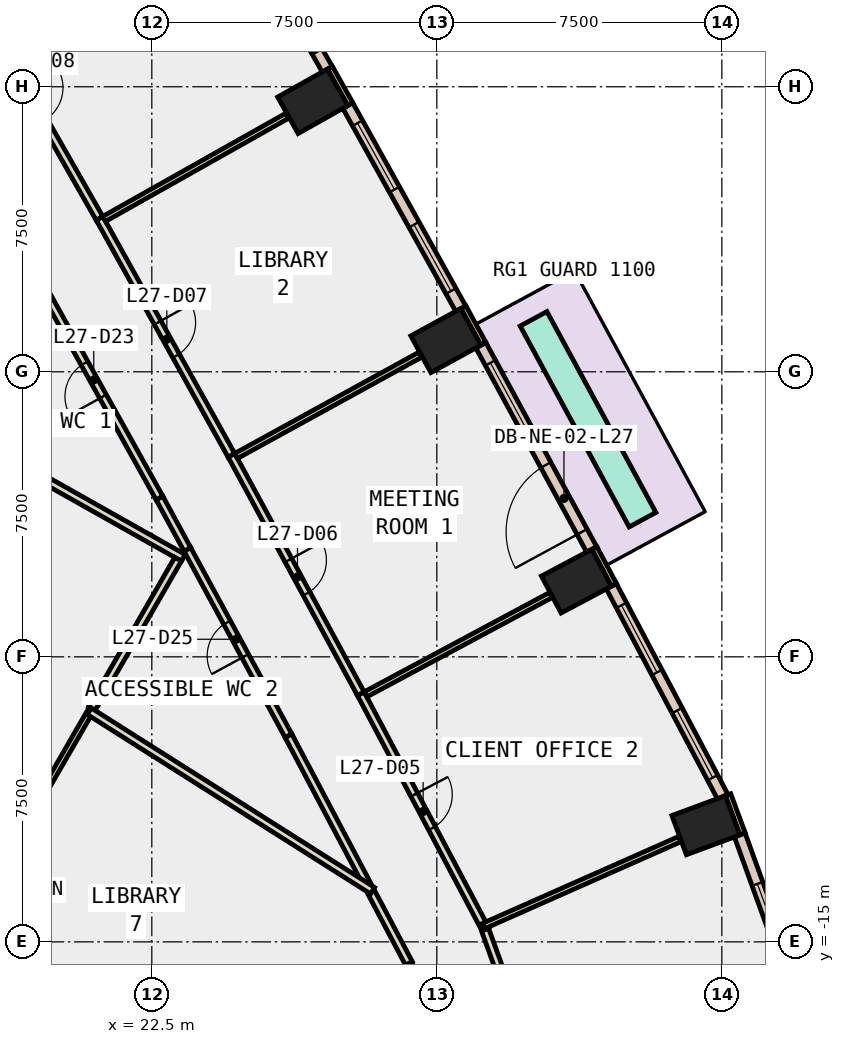
"""IFC4 building model, lengths in metres.
Left out: names, types, materials, properties, quantities, classifications, styles, units other than length and angle.
Written with IfcOpenShell. Run it as: python <this file> out.ifc"""

import sys

from ifc_helpers import new_model, si_unit, direction, frame, frame_2d, origin, origin_2d, place, context, subcontext, project, spatial, rectangle, extrude, element, fill, save


model = new_model("IFC4")
c1 = context("Model", 3, precision=1e-05, world=origin(), true_north=direction((0.0, 1.0)))
c2 = subcontext(c1, "Body", "Model", "MODEL_VIEW")
j1 = project(units=[si_unit("LENGTHUNIT", "METRE"), si_unit("PLANEANGLEUNIT", "RADIAN")], contexts=[c1])
p1 = place(None, origin())
s1 = spatial("IfcSite", under=j1, at=p1, CompositionType="ELEMENT")
p2 = place(p1, origin())
s2 = spatial("IfcBuilding", under=s1, at=p2, CompositionType="ELEMENT")
p3 = place(p2, frame((0.0, 0.0, 124.4)))
s3 = spatial("IfcBuildingStorey", under=s2, at=p3, CompositionType="ELEMENT", Elevation=124.4)
for number, where, z_axis, x_axis in (
    (1, (37.08, -11.931, -0.4), (0.0, 0.0, 1.0), (-0.347, 0.938, 0.0)),
    (2, (33.674, -5.509, -0.4), (0.0, 0.0, 1.0), (-0.469, 0.883, 0.0)),
    (3, (30.238, 0.822, -0.4), (0.0, 0.0, 1.0), (-0.48, 0.877, 0.0)),
    (4, (26.735, 7.117, -0.4), (0.0, 0.0, 1.0), (-0.49, 0.872, 0.0)),
):
    element("IfcColumn", number, at=place(p3, frame(where, z_axis=z_axis, x_axis=x_axis)), inside=s3, PredefinedType="COLUMN", context=c2, shape_type="SweptSolid", body=[
        extrude(rectangle(XDim=1.1, YDim=1.5, at=origin_2d()), origin(), (0.0, 0.0, 1.0), 4.2),
    ])
p4 = place(p3, frame((38.045, -12.16, 0.0), z_axis=(0.0, 0.0, 1.0), x_axis=(-0.347010833361, 0.937861120598, 0.0)))
e5 = element("IfcWall", 5, at=p4, inside=s3, PredefinedType="STANDARD", context=c2, shape_type="SweptSolid", body=[
    extrude(rectangle(XDim=1.1, YDim=0.15, at=frame_2d((0.55, 0.0))), origin(), (0.0, 0.0, 1.0), 3.8),
])
p5 = place(p3, frame((34.661, -5.608, 0.0), z_axis=(0.0, 0.0, 1.0), x_axis=(-0.46919310775, 0.883095593716, 0.0)))
e6 = element("IfcWall", 6, at=p5, inside=s3, PredefinedType="STANDARD", context=c2, shape_type="SweptSolid", body=[
    extrude(rectangle(XDim=1.099, YDim=0.15, at=frame_2d((0.55, 0.0))), origin(), (0.0, 0.0, 1.0), 3.8),
])
p6 = place(p3, frame((31.226, 0.735, 0.0), z_axis=(0.0, 0.0, 1.0), x_axis=(-0.479737645119, 0.877411985247, 0.0)))
e7 = element("IfcWall", 7, at=p6, inside=s3, PredefinedType="STANDARD", context=c2, shape_type="SweptSolid", body=[
    extrude(rectangle(XDim=1.101, YDim=0.15, at=frame_2d((0.55, 0.0))), origin(), (0.0, 0.0, 1.0), 3.8),
])
p7 = place(p3, frame((27.724, 7.042, 0.0), z_axis=(0.0, 0.0, 1.0), x_axis=(-0.490008344094, 0.871717742574, 0.0)))
e8 = element("IfcWall", 8, at=p7, inside=s3, PredefinedType="STANDARD", context=c2, shape_type="SweptSolid", body=[
    extrude(rectangle(XDim=1.1, YDim=0.15, at=frame_2d((0.55, 0.0))), origin(), (0.0, 0.0, 1.0), 3.8),
])
p8 = place(p3, frame((39.379, -16.077, 0.0), z_axis=(0.0, 0.0, 1.0), x_axis=(-0.340477955209, 0.940252499075, 0.0)))
e9 = element("IfcWall", 9, at=p8, inside=s3, PredefinedType="STANDARD", context=c2, shape_type="SweptSolid", body=[
    extrude(rectangle(XDim=4.138, YDim=0.3, at=frame_2d((2.069, 0.0))), origin(), (0.0, 0.0, 1.0), 3.8),
])
p9 = place(p8, frame((1.369, 0.0, 0.9)))
e10 = element("IfcOpeningElement", 10, at=p9, cuts=e9, PredefinedType="OPENING", context=c2, shape_type="SweptSolid", body=[
    extrude(rectangle(XDim=1.4, YDim=2.6, at=frame_2d((0.7, 1.3))), frame((0.0, 0.16, 0.0), z_axis=(0.0, -1.0, 0.0), x_axis=(1.0, 0.0, 0.0)), (0.0, 0.0, 1.0), 0.32),
])
p10 = place(p3, frame((37.523, -11.181, 0.0), z_axis=(0.0, 0.0, 1.0), x_axis=(-0.467654949391, 0.883911108828, 0.0)))
e11 = element("IfcWall", 11, at=p10, inside=s3, PredefinedType="STANDARD", context=c2, shape_type="SweptSolid", body=[
    extrude(rectangle(XDim=6.265, YDim=0.3, at=frame_2d((3.133, 0.0))), origin(), (0.0, 0.0, 1.0), 3.8),
])
p11 = place(p10, frame((0.566, 0.0, 0.9)))
e12 = element("IfcOpeningElement", 12, at=p11, cuts=e11, PredefinedType="OPENING", context=c2, shape_type="SweptSolid", body=[
    extrude(rectangle(XDim=2.0, YDim=2.6, at=frame_2d((1.0, 1.3))), frame((0.0, 0.16, 0.0), z_axis=(0.0, -1.0, 0.0), x_axis=(1.0, 0.0, 0.0)), (0.0, 0.0, 1.0), 0.32),
])
p12 = place(p10, frame((3.699, 0.0, 0.9)))
e13 = element("IfcOpeningElement", 13, at=p12, cuts=e11, PredefinedType="OPENING", context=c2, shape_type="SweptSolid", body=[
    extrude(rectangle(XDim=2.0, YDim=2.6, at=frame_2d((1.0, 1.3))), frame((0.0, 0.16, 0.0), z_axis=(0.0, -1.0, 0.0), x_axis=(1.0, 0.0, 0.0)), (0.0, 0.0, 1.0), 0.32),
])
p13 = place(p3, frame((34.075, -4.675, 0.0), z_axis=(0.0, 0.0, 1.0), x_axis=(-0.476982616152, 0.878912728255, 0.0)))
e14 = element("IfcWall", 14, at=p13, inside=s3, PredefinedType="STANDARD", context=c2, shape_type="SweptSolid", body=[
    extrude(rectangle(XDim=6.115, YDim=0.3, at=frame_2d((3.058, 0.0))), origin(), (0.0, 0.0, 1.0), 3.8),
])
p14 = place(p13, frame((0.529, 0.0, 0.0)))
e15 = element("IfcOpeningElement", 15, at=p14, cuts=e14, PredefinedType="OPENING", context=c2, shape_type="SweptSolid", body=[
    extrude(rectangle(XDim=2.0, YDim=2.4, at=frame_2d((1.0, 1.2))), frame((0.0, 0.16, 0.0), z_axis=(0.0, -1.0, 0.0), x_axis=(1.0, 0.0, 0.0)), (0.0, 0.0, 1.0), 0.32),
])
p15 = place(p13, frame((3.587, 0.0, 0.9)))
e16 = element("IfcOpeningElement", 16, at=p15, cuts=e14, PredefinedType="OPENING", context=c2, shape_type="SweptSolid", body=[
    extrude(rectangle(XDim=2.0, YDim=2.6, at=frame_2d((1.0, 1.3))), frame((0.0, 0.16, 0.0), z_axis=(0.0, -1.0, 0.0), x_axis=(1.0, 0.0, 0.0)), (0.0, 0.0, 1.0), 0.32),
])
p16 = place(p3, frame((30.629, 1.662, 0.0), z_axis=(0.0, 0.0, 1.0), x_axis=(-0.486229342917, 0.873831234327, 0.0)))
e17 = element("IfcWall", 17, at=p16, inside=s3, PredefinedType="STANDARD", context=c2, shape_type="SweptSolid", body=[
    extrude(rectangle(XDim=6.114, YDim=0.3, at=frame_2d((3.057, 0.0))), origin(), (0.0, 0.0, 1.0), 3.8),
])
p17 = place(p16, frame((0.529, 0.0, 0.9)))
e18 = element("IfcOpeningElement", 18, at=p17, cuts=e17, PredefinedType="OPENING", context=c2, shape_type="SweptSolid", body=[
    extrude(rectangle(XDim=2.0, YDim=2.6, at=frame_2d((1.0, 1.3))), frame((0.0, 0.16, 0.0), z_axis=(0.0, -1.0, 0.0), x_axis=(1.0, 0.0, 0.0)), (0.0, 0.0, 1.0), 0.32),
])
p18 = place(p16, frame((3.586, 0.0, 0.9)))
e19 = element("IfcOpeningElement", 19, at=p18, cuts=e17, PredefinedType="OPENING", context=c2, shape_type="SweptSolid", body=[
    extrude(rectangle(XDim=2.0, YDim=2.6, at=frame_2d((1.0, 1.3))), frame((0.0, 0.16, 0.0), z_axis=(0.0, -1.0, 0.0), x_axis=(1.0, 0.0, 0.0)), (0.0, 0.0, 1.0), 0.32),
])
p19 = place(p3, frame((27.117, 7.961, 0.0), z_axis=(0.0, 0.0, 1.0), x_axis=(-0.495472401298, 0.868623681206, 0.0)))
e20 = element("IfcWall", 20, at=p19, inside=s3, PredefinedType="STANDARD", context=c2, shape_type="SweptSolid", body=[
    extrude(rectangle(XDim=6.115, YDim=0.3, at=frame_2d((3.058, 0.0))), origin(), (0.0, 0.0, 1.0), 3.8),
])
p20 = place(p19, frame((0.529, 0.0, 0.9)))
e21 = element("IfcOpeningElement", 21, at=p20, cuts=e20, PredefinedType="OPENING", context=c2, shape_type="SweptSolid", body=[
    extrude(rectangle(XDim=2.0, YDim=2.6, at=frame_2d((1.0, 1.3))), frame((0.0, 0.16, 0.0), z_axis=(0.0, -1.0, 0.0), x_axis=(1.0, 0.0, 0.0)), (0.0, 0.0, 1.0), 0.32),
])
p21 = place(p19, frame((3.587, 0.0, 0.9)))
e22 = element("IfcOpeningElement", 22, at=p21, cuts=e20, PredefinedType="OPENING", context=c2, shape_type="SweptSolid", body=[
    extrude(rectangle(XDim=2.0, YDim=2.6, at=frame_2d((1.0, 1.3))), frame((0.0, 0.16, 0.0), z_axis=(0.0, -1.0, 0.0), x_axis=(1.0, 0.0, 0.0)), (0.0, 0.0, 1.0), 0.32),
])
p22 = place(p3, frame((35.413, -3.892, 0.0), z_axis=(0.0, 0.0, 1.0), x_axis=(-0.476905516251, 0.878954565702, 0.0)))
e23 = element("IfcWall", 23, at=p22, inside=s3, PredefinedType="STANDARD", context=c2, shape_type="SweptSolid", body=[
    extrude(rectangle(XDim=6.014, YDim=0.8, at=frame_2d((3.007, 0.0))), origin(), (0.0, 0.0, 1.0), 0.8),
])
p23 = place(p3, frame((23.437, -4.676, 0.0), z_axis=(0.0, 0.0, 1.0), x_axis=(-0.47686467088, 0.878976726465, 0.0)))
e24 = element("IfcWall", 24, at=p23, inside=s3, PredefinedType="PARTITIONING", context=c2, shape_type="SweptSolid", body=[
    extrude(rectangle(XDim=1.542, YDim=0.2, at=frame_2d((0.771, 0.0))), origin(), (0.0, 0.0, 1.0), 3.8),
])
p24 = place(p3, frame((22.702, -3.321, 0.0), z_axis=(0.0, 0.0, 1.0), x_axis=(-0.486304341235, 0.873789498504, 0.0)))
e25 = element("IfcWall", 25, at=p24, inside=s3, PredefinedType="PARTITIONING", context=c2, shape_type="SweptSolid", body=[
    extrude(rectangle(XDim=7.113, YDim=0.2, at=frame_2d((3.556, 0.0))), origin(), (0.0, 0.0, 1.0), 3.8),
])
p25 = place(p24, frame((3.057, 0.0, 0.0)))
e26 = element("IfcOpeningElement", 26, at=p25, cuts=e25, PredefinedType="OPENING", context=c2, shape_type="SweptSolid", body=[
    extrude(rectangle(XDim=1.0, YDim=2.1, at=frame_2d((0.5, 1.05))), frame((0.0, 0.11, 0.0), z_axis=(0.0, -1.0, 0.0), x_axis=(1.0, 0.0, 0.0)), (0.0, 0.0, 1.0), 0.22),
])
p26 = place(p3, frame((29.816, -17.128, 0.0), z_axis=(0.0, 0.0, 1.0), x_axis=(-0.340726116699, 0.940162599447, 0.0)))
e27 = element("IfcWall", 27, at=p26, inside=s3, PredefinedType="PARTITIONING", context=c2, shape_type="SweptSolid", body=[
    extrude(rectangle(XDim=1.658, YDim=0.2, at=frame_2d((0.829, 0.0))), origin(), (0.0, 0.0, 1.0), 3.8),
])
p27 = place(p3, frame((29.264, -15.564, 0.0), z_axis=(0.0, 0.0, 1.0), x_axis=(-0.46760771465, 0.883936097917, 0.0)))
e28 = element("IfcWall", 28, at=p27, inside=s3, PredefinedType="PARTITIONING", context=c2, shape_type="SweptSolid", body=[
    extrude(rectangle(XDim=2.123, YDim=0.2, at=frame_2d((1.062, 0.0))), origin(), (0.0, 0.0, 1.0), 3.8),
])
p28 = place(p3, frame((28.177, -13.51, 0.0), z_axis=(0.0, 0.0, 1.0), x_axis=(-0.467580354248, 0.883950571198, 0.0)))
e29 = element("IfcWall", 29, at=p28, inside=s3, PredefinedType="PARTITIONING", context=c2, shape_type="SweptSolid", body=[
    extrude(rectangle(XDim=4.453, YDim=0.2, at=frame_2d((2.227, 0.0))), origin(), (0.0, 0.0, 1.0), 3.8),
])
p29 = place(p3, frame((26.095, -9.574, 0.0), z_axis=(0.0, 0.0, 1.0), x_axis=(-0.476963271937, 0.878923226012, 0.0)))
e30 = element("IfcWall", 30, at=p29, inside=s3, PredefinedType="PARTITIONING", context=c2, shape_type="SweptSolid", body=[
    extrude(rectangle(XDim=5.573, YDim=0.2, at=frame_2d((2.786, 0.0))), origin(), (0.0, 0.0, 1.0), 3.8),
])
p30 = place(p29, frame((2.386, 0.0, 0.0)))
e31 = element("IfcOpeningElement", 31, at=p30, cuts=e30, PredefinedType="OPENING", context=c2, shape_type="SweptSolid", body=[
    extrude(rectangle(XDim=1.0, YDim=2.1, at=frame_2d((0.5, 1.05))), frame((0.0, 0.11, 0.0), z_axis=(0.0, -1.0, 0.0), x_axis=(1.0, 0.0, 0.0)), (0.0, 0.0, 1.0), 0.22),
])
p31 = place(p3, frame((31.268, -14.676, 0.0), z_axis=(0.0, 0.0, 1.0), x_axis=(0.340269739222, -0.940327870782, 0.0)))
e32 = element("IfcWall", 32, at=p31, inside=s3, PredefinedType="PARTITIONING", context=c2, shape_type="SweptSolid", body=[
    extrude(rectangle(XDim=2.715, YDim=0.2, at=frame_2d((1.357, 0.0))), origin(), (0.0, 0.0, 1.0), 3.8),
])
p32 = place(p3, frame((27.999, -8.469, 0.0), z_axis=(0.0, 0.0, 1.0), x_axis=(0.467683043694, -0.883896244274, 0.0)))
e33 = element("IfcWall", 33, at=p32, inside=s3, PredefinedType="PARTITIONING", context=c2, shape_type="SweptSolid", body=[
    extrude(rectangle(XDim=7.015, YDim=0.2, at=frame_2d((3.508, 0.0))), origin(), (0.0, 0.0, 1.0), 3.8),
])
p33 = place(p32, frame((3.008, 0.0, 0.0)))
e34 = element("IfcOpeningElement", 34, at=p33, cuts=e33, PredefinedType="OPENING", context=c2, shape_type="SweptSolid", body=[
    extrude(rectangle(XDim=1.0, YDim=2.1, at=frame_2d((0.5, 1.05))), frame((0.0, 0.11, 0.0), z_axis=(0.0, -1.0, 0.0), x_axis=(1.0, 0.0, 0.0)), (0.0, 0.0, 1.0), 0.22),
])
p34 = place(p3, frame((24.595, -2.196, 0.0), z_axis=(0.0, 0.0, 1.0), x_axis=(0.47695522124, -0.878927594818, 0.0)))
e35 = element("IfcWall", 35, at=p34, inside=s3, PredefinedType="PARTITIONING", context=c2, shape_type="SweptSolid", body=[
    extrude(rectangle(XDim=7.137, YDim=0.2, at=frame_2d((3.568, 0.0))), origin(), (0.0, 0.0, 1.0), 3.8),
])
p35 = place(p34, frame((3.144, 0.0, 0.0)))
e36 = element("IfcOpeningElement", 36, at=p35, cuts=e35, PredefinedType="OPENING", context=c2, shape_type="SweptSolid", body=[
    extrude(rectangle(XDim=1.0, YDim=2.1, at=frame_2d((0.5, 1.05))), frame((0.0, 0.11, 0.0), z_axis=(0.0, -1.0, 0.0), x_axis=(1.0, 0.0, 0.0)), (0.0, 0.0, 1.0), 0.22),
])
p36 = place(p3, frame((21.124, 4.04, 0.0), z_axis=(0.0, 0.0, 1.0), x_axis=(0.486229558972, -0.873831114107, 0.0)))
e37 = element("IfcWall", 37, at=p36, inside=s3, PredefinedType="PARTITIONING", context=c2, shape_type="SweptSolid", body=[
    extrude(rectangle(XDim=7.136, YDim=0.2, at=frame_2d((3.568, 0.0))), origin(), (0.0, 0.0, 1.0), 3.8),
])
p37 = place(p36, frame((3.143, 0.0, 0.0)))
e38 = element("IfcOpeningElement", 38, at=p37, cuts=e37, PredefinedType="OPENING", context=c2, shape_type="SweptSolid", body=[
    extrude(rectangle(XDim=1.0, YDim=2.1, at=frame_2d((0.5, 1.05))), frame((0.0, 0.11, 0.0), z_axis=(0.0, -1.0, 0.0), x_axis=(1.0, 0.0, 0.0)), (0.0, 0.0, 1.0), 0.22),
])
p38 = place(p3, frame((17.623, 10.175, 0.0), z_axis=(0.0, 0.0, 1.0), x_axis=(0.4954688358, -0.868625714995, 0.0)))
e39 = element("IfcWall", 39, at=p38, inside=s3, PredefinedType="PARTITIONING", context=c2, shape_type="SweptSolid", body=[
    extrude(rectangle(XDim=7.064, YDim=0.2, at=frame_2d((3.532, 0.0))), origin(), (0.0, 0.0, 1.0), 3.8),
])
p39 = place(p38, frame((3.107, 0.0, 0.0)))
e40 = element("IfcOpeningElement", 40, at=p39, cuts=e39, PredefinedType="OPENING", context=c2, shape_type="SweptSolid", body=[
    extrude(rectangle(XDim=1.0, YDim=2.1, at=frame_2d((0.5, 1.05))), frame((0.0, 0.11, 0.0), z_axis=(0.0, -1.0, 0.0), x_axis=(1.0, 0.0, 0.0)), (0.0, 0.0, 1.0), 0.22),
])
p40 = place(p3, frame((16.27, -0.919, 0.0), z_axis=(0.0, 0.0, 1.0), x_axis=(0.871308980511, -0.490734816863, 0.0)))
e41 = element("IfcWall", 41, at=p40, inside=s3, PredefinedType="PARTITIONING", context=c2, shape_type="SweptSolid", body=[
    extrude(rectangle(XDim=8.1, YDim=0.2, at=frame_2d((4.05, 0.0))), origin(), (0.0, 0.0, 1.0), 3.8),
])
p41 = place(p3, frame((20.924, -8.858, 0.0), z_axis=(0.0, 0.0, 1.0), x_axis=(-0.499996828157, -0.866027235041, 0.0)))
e42 = element("IfcWall", 42, at=p41, inside=s3, PredefinedType="PARTITIONING", context=c2, shape_type="SweptSolid", body=[
    extrude(rectangle(XDim=11.04, YDim=0.15, at=frame_2d((5.52, 0.0))), origin(), (0.0, 0.0, 1.0), 3.8),
])
p42 = place(p3, frame((23.191, -4.932, 0.0), z_axis=(0.0, 0.0, 1.0), x_axis=(-0.500025458316, -0.86601070492, 0.0)))
e43 = element("IfcWall", 43, at=p42, inside=s3, PredefinedType="PARTITIONING", context=c2, shape_type="SweptSolid", body=[
    extrude(rectangle(XDim=4.533, YDim=0.2, at=frame_2d((2.267, 0.0))), origin(), (0.0, 0.0, 1.0), 3.8),
])
p43 = place(p3, frame((20.853, -8.931, 0.0), z_axis=(0.0, 0.0, 1.0), x_axis=(0.844869091455, -0.534973100542, 0.0)))
e44 = element("IfcWall", 44, at=p43, inside=s3, PredefinedType="PARTITIONING", context=c2, shape_type="SweptSolid", body=[
    extrude(rectangle(XDim=8.825, YDim=0.2, at=frame_2d((4.413, 0.0))), origin(), (0.0, 0.0, 1.0), 3.8),
])
p44 = place(p3, frame((31.233, -14.582, 0.0), z_axis=(0.0, 0.0, 1.0), x_axis=(0.914317360249, 0.404998474994, 0.0)))
e45 = element("IfcWall", 45, at=p44, inside=s3, PredefinedType="PARTITIONING", context=c2, shape_type="SweptSolid", body=[
    extrude(rectangle(XDim=5.645, YDim=0.15, at=frame_2d((2.822, 0.0))), origin(), (0.0, 0.0, 1.0), 3.8),
])
p45 = place(p3, frame((28.123, -8.488, 0.0), z_axis=(0.0, 0.0, 1.0), x_axis=(0.881406449288, 0.472358625573, 0.0)))
e46 = element("IfcWall", 46, at=p45, inside=s3, PredefinedType="PARTITIONING", context=c2, shape_type="SweptSolid", body=[
    extrude(rectangle(XDim=5.53, YDim=0.15, at=frame_2d((2.765, 0.0))), origin(), (0.0, 0.0, 1.0), 3.8),
])
p46 = place(p3, frame((24.718, -2.214, 0.0), z_axis=(0.0, 0.0, 1.0), x_axis=(0.876382720351, 0.481615331432, 0.0)))
e47 = element("IfcWall", 47, at=p46, inside=s3, PredefinedType="PARTITIONING", context=c2, shape_type="SweptSolid", body=[
    extrude(rectangle(XDim=5.53, YDim=0.15, at=frame_2d((2.765, 0.0))), origin(), (0.0, 0.0, 1.0), 3.8),
])
p47 = place(p3, frame((21.247, 4.024, 0.0), z_axis=(0.0, 0.0, 1.0), x_axis=(0.871261721438, 0.490818716795, 0.0)))
e48 = element("IfcWall", 48, at=p47, inside=s3, PredefinedType="PARTITIONING", context=c2, shape_type="SweptSolid", body=[
    extrude(rectangle(XDim=5.53, YDim=0.15, at=frame_2d((2.765, 0.0))), origin(), (0.0, 0.0, 1.0), 3.8),
])
p48 = place(p9, origin())
e49 = element("IfcWindow", 49, at=p48, inside=s3, PartitioningType="SINGLE_PANEL", PredefinedType="WINDOW", context=c2, shape_type="SweptSolid", body=[
    extrude(rectangle(XDim=1.4, YDim=2.6, at=frame_2d((0.7, 1.3))), frame((0.0, 0.03, 0.0), z_axis=(0.0, -1.0, 0.0), x_axis=(1.0, 0.0, 0.0)), (0.0, 0.0, 1.0), 0.06),
])
fill(e10, e49)
p49 = place(p11, origin())
e50 = element("IfcWindow", 50, at=p49, inside=s3, PartitioningType="SINGLE_PANEL", PredefinedType="WINDOW", context=c2, shape_type="SweptSolid", body=[
    extrude(rectangle(XDim=2.0, YDim=2.6, at=frame_2d((1.0, 1.3))), frame((0.0, 0.03, 0.0), z_axis=(0.0, -1.0, 0.0), x_axis=(1.0, 0.0, 0.0)), (0.0, 0.0, 1.0), 0.06),
])
fill(e12, e50)
p50 = place(p12, origin())
e51 = element("IfcWindow", 51, at=p50, inside=s3, PartitioningType="SINGLE_PANEL", PredefinedType="WINDOW", context=c2, shape_type="SweptSolid", body=[
    extrude(rectangle(XDim=2.0, YDim=2.6, at=frame_2d((1.0, 1.3))), frame((0.0, 0.03, 0.0), z_axis=(0.0, -1.0, 0.0), x_axis=(1.0, 0.0, 0.0)), (0.0, 0.0, 1.0), 0.06),
])
fill(e13, e51)
p51 = place(p14, origin())
e52 = element("IfcDoor", 52, at=p51, inside=s3, OperationType="SLIDING_TO_LEFT", PredefinedType="DOOR", context=c2, shape_type="SweptSolid", body=[
    extrude(rectangle(XDim=2.0, YDim=2.4, at=frame_2d((1.0, 1.2))), frame((0.0, 0.025, 0.0), z_axis=(0.0, -1.0, 0.0), x_axis=(1.0, 0.0, 0.0)), (0.0, 0.0, 1.0), 0.05),
])
fill(e15, e52)
p52 = place(p15, origin())
e53 = element("IfcWindow", 53, at=p52, inside=s3, PartitioningType="SINGLE_PANEL", PredefinedType="WINDOW", context=c2, shape_type="SweptSolid", body=[
    extrude(rectangle(XDim=2.0, YDim=2.6, at=frame_2d((1.0, 1.3))), frame((0.0, 0.03, 0.0), z_axis=(0.0, -1.0, 0.0), x_axis=(1.0, 0.0, 0.0)), (0.0, 0.0, 1.0), 0.06),
])
fill(e16, e53)
p53 = place(p17, origin())
e54 = element("IfcWindow", 54, at=p53, inside=s3, PartitioningType="SINGLE_PANEL", PredefinedType="WINDOW", context=c2, shape_type="SweptSolid", body=[
    extrude(rectangle(XDim=2.0, YDim=2.6, at=frame_2d((1.0, 1.3))), frame((0.0, 0.03, 0.0), z_axis=(0.0, -1.0, 0.0), x_axis=(1.0, 0.0, 0.0)), (0.0, 0.0, 1.0), 0.06),
])
fill(e18, e54)
p54 = place(p18, origin())
e55 = element("IfcWindow", 55, at=p54, inside=s3, PartitioningType="SINGLE_PANEL", PredefinedType="WINDOW", context=c2, shape_type="SweptSolid", body=[
    extrude(rectangle(XDim=2.0, YDim=2.6, at=frame_2d((1.0, 1.3))), frame((0.0, 0.03, 0.0), z_axis=(0.0, -1.0, 0.0), x_axis=(1.0, 0.0, 0.0)), (0.0, 0.0, 1.0), 0.06),
])
fill(e19, e55)
p55 = place(p20, origin())
e56 = element("IfcWindow", 56, at=p55, inside=s3, PartitioningType="SINGLE_PANEL", PredefinedType="WINDOW", context=c2, shape_type="SweptSolid", body=[
    extrude(rectangle(XDim=2.0, YDim=2.6, at=frame_2d((1.0, 1.3))), frame((0.0, 0.03, 0.0), z_axis=(0.0, -1.0, 0.0), x_axis=(1.0, 0.0, 0.0)), (0.0, 0.0, 1.0), 0.06),
])
fill(e21, e56)
p56 = place(p33, origin())
e57 = element("IfcDoor", 57, at=p56, inside=s3, OperationType="SINGLE_SWING_LEFT", PredefinedType="DOOR", context=c2, shape_type="SweptSolid", body=[
    extrude(rectangle(XDim=1.0, YDim=2.1, at=frame_2d((0.5, 1.05))), frame((0.0, 0.025, 0.0), z_axis=(0.0, -1.0, 0.0), x_axis=(1.0, 0.0, 0.0)), (0.0, 0.0, 1.0), 0.05),
])
fill(e34, e57)
p57 = place(p35, origin())
e58 = element("IfcDoor", 58, at=p57, inside=s3, OperationType="SINGLE_SWING_LEFT", PredefinedType="DOOR", context=c2, shape_type="SweptSolid", body=[
    extrude(rectangle(XDim=1.0, YDim=2.1, at=frame_2d((0.5, 1.05))), frame((0.0, 0.025, 0.0), z_axis=(0.0, -1.0, 0.0), x_axis=(1.0, 0.0, 0.0)), (0.0, 0.0, 1.0), 0.05),
])
fill(e36, e58)
p58 = place(p37, origin())
e59 = element("IfcDoor", 59, at=p58, inside=s3, OperationType="SINGLE_SWING_RIGHT", PredefinedType="DOOR", context=c2, shape_type="SweptSolid", body=[
    extrude(rectangle(XDim=1.0, YDim=2.1, at=frame_2d((0.5, 1.05))), frame((0.0, 0.025, 0.0), z_axis=(0.0, -1.0, 0.0), x_axis=(1.0, 0.0, 0.0)), (0.0, 0.0, 1.0), 0.05),
])
fill(e38, e59)
p59 = place(p25, origin())
e60 = element("IfcDoor", 60, at=p59, inside=s3, OperationType="SINGLE_SWING_LEFT", PredefinedType="DOOR", context=c2, shape_type="SweptSolid", body=[
    extrude(rectangle(XDim=1.0, YDim=2.1, at=frame_2d((0.5, 1.05))), frame((0.0, 0.025, 0.0), z_axis=(0.0, -1.0, 0.0), x_axis=(1.0, 0.0, 0.0)), (0.0, 0.0, 1.0), 0.05),
])
fill(e26, e60)
p60 = place(p30, origin())
e61 = element("IfcDoor", 61, at=p60, inside=s3, OperationType="SINGLE_SWING_LEFT", PredefinedType="DOOR", context=c2, shape_type="SweptSolid", body=[
    extrude(rectangle(XDim=1.0, YDim=2.1, at=frame_2d((0.5, 1.05))), frame((0.0, 0.025, 0.0), z_axis=(0.0, -1.0, 0.0), x_axis=(1.0, 0.0, 0.0)), (0.0, 0.0, 1.0), 0.05),
])
fill(e31, e61)
save(model, sys.argv[1])
